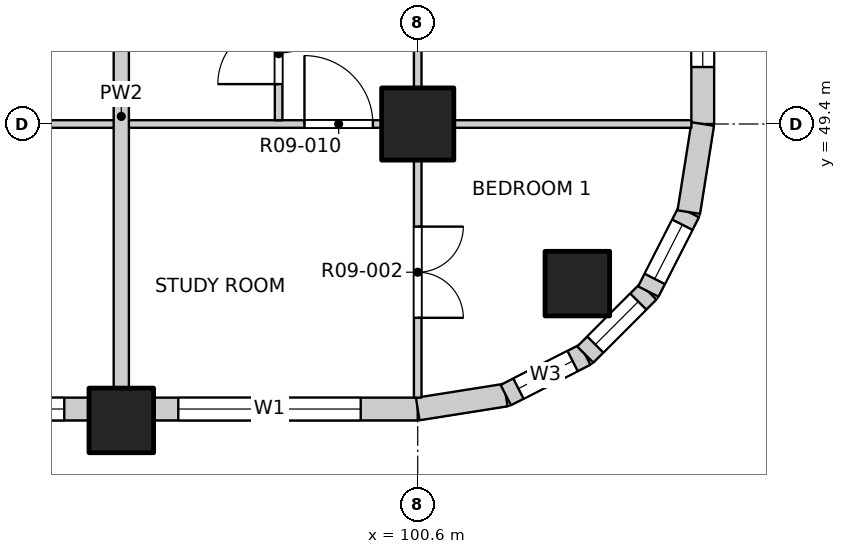
"""IFC4 building model, lengths in metres.
Left out: names, types, materials, properties, quantities, classifications, styles, units other than length and angle.
Written with IfcOpenShell. Run it as: python <this file> out.ifc"""

import sys

from ifc_helpers import new_model, si_unit, direction, frame, frame_2d, origin, origin_2d, place, context, subcontext, project, spatial, rectangle, extrude, element, fill, save


model = new_model("IFC4")
c1 = context("Model", 3, precision=1e-05, world=origin(), true_north=direction((0.0, 1.0)))
c2 = subcontext(c1, "Body", "Model", "MODEL_VIEW")
j1 = project(units=[si_unit("LENGTHUNIT", "METRE"), si_unit("PLANEANGLEUNIT", "RADIAN")], contexts=[c1])
p1 = place(None, origin())
s1 = spatial("IfcSite", under=j1, at=p1, CompositionType="ELEMENT")
p2 = place(p1, origin())
s2 = spatial("IfcBuilding", under=s1, at=p2, CompositionType="ELEMENT")
p3 = place(p2, frame((0.0, 0.0, 113.5)))
s3 = spatial("IfcBuildingStorey", under=s2, at=p3, CompositionType="ELEMENT", Elevation=113.5)
for number, where, z_axis, x_axis in (
    (1, (102.7, 47.3, -0.25), (0.0, 0.0, 1.0), (1.0, 0.0, 0.0)),
    (2, (96.7, 45.5, -0.25), (0.0, 0.0, 1.0), (1.0, 0.0, 0.0)),
):
    element("IfcColumn", number, at=place(p3, frame(where, z_axis=z_axis, x_axis=x_axis)), inside=s3, PredefinedType="COLUMN", context=c2, shape_type="SweptSolid", body=[
        extrude(rectangle(XDim=0.85, YDim=0.85, at=origin_2d()), origin(), (0.0, 0.0, 1.0), 3.35),
    ])
p4 = place(p3, frame((100.6, 49.4, -0.25), z_axis=(0.0, 0.0, 1.0), x_axis=(1.0, 0.0, 0.0)))
e3 = element("IfcColumn", 3, at=p4, inside=s3, PredefinedType="COLUMN", context=c2, shape_type="SweptSolid", body=[
    extrude(rectangle(XDim=0.95, YDim=0.95, at=origin_2d()), origin(), (0.0, 0.0, 1.0), 3.35),
])
p5 = place(p3, frame((89.325, 45.65, 0.0), z_axis=(0.0, 0.0, 1.0), x_axis=(1.0, 0.0, 0.0)))
e4 = element("IfcWall", 4, at=p5, inside=s3, PredefinedType="SOLIDWALL", context=c2, shape_type="SweptSolid", body=[
    extrude(rectangle(XDim=6.95, YDim=0.3, at=frame_2d((3.475, 0.0))), origin(), (0.0, 0.0, 1.0), 3.1),
])
p6 = place(p5, frame((0.325, 0.0, 0.9)))
e5 = element("IfcOpeningElement", 5, at=p6, cuts=e4, PredefinedType="OPENING", context=c2, shape_type="SweptSolid", body=[
    extrude(rectangle(XDim=2.4, YDim=1.8, at=frame_2d((1.2, 0.9))), frame((0.0, 0.16, 0.0), z_axis=(0.0, -1.0, 0.0), x_axis=(1.0, 0.0, 0.0)), (0.0, 0.0, 1.0), 0.32),
])
p7 = place(p5, frame((4.225, 0.0, 0.9)))
e6 = element("IfcOpeningElement", 6, at=p7, cuts=e4, PredefinedType="OPENING", context=c2, shape_type="SweptSolid", body=[
    extrude(rectangle(XDim=2.4, YDim=1.8, at=frame_2d((1.2, 0.9))), frame((0.0, 0.16, 0.0), z_axis=(0.0, -1.0, 0.0), x_axis=(1.0, 0.0, 0.0)), (0.0, 0.0, 1.0), 0.32),
])
p8 = place(p3, frame((97.125, 45.65, 0.0), z_axis=(0.0, 0.0, 1.0), x_axis=(1.0, 0.0, 0.0)))
e7 = element("IfcWall", 7, at=p8, inside=s3, PredefinedType="SOLIDWALL", context=c2, shape_type="SweptSolid", body=[
    extrude(rectangle(XDim=3.475, YDim=0.3, at=frame_2d((1.738, 0.0))), origin(), (0.0, 0.0, 1.0), 3.1),
])
p9 = place(p8, frame((0.325, 0.0, 0.9)))
e8 = element("IfcOpeningElement", 8, at=p9, cuts=e7, PredefinedType="OPENING", context=c2, shape_type="SweptSolid", body=[
    extrude(rectangle(XDim=2.4, YDim=1.8, at=frame_2d((1.2, 0.9))), frame((0.0, 0.16, 0.0), z_axis=(0.0, -1.0, 0.0), x_axis=(1.0, 0.0, 0.0)), (0.0, 0.0, 1.0), 0.32),
])
p10 = place(p3, frame((104.35, 49.4, 0.0), z_axis=(0.0, 0.0, 1.0), x_axis=(0.0, 1.0, 0.0)))
e9 = element("IfcWall", 9, at=p10, inside=s3, PredefinedType="SOLIDWALL", context=c2, shape_type="SweptSolid", body=[
    extrude(rectangle(XDim=3.475, YDim=0.3, at=frame_2d((1.738, 0.0))), origin(), (0.0, 0.0, 1.0), 3.1),
])
p11 = place(p10, frame((0.75, 0.0, 0.9)))
e10 = element("IfcOpeningElement", 10, at=p11, cuts=e9, PredefinedType="OPENING", context=c2, shape_type="SweptSolid", body=[
    extrude(rectangle(XDim=2.4, YDim=1.8, at=frame_2d((1.2, 0.9))), frame((0.0, 0.16, 0.0), z_axis=(0.0, -1.0, 0.0), x_axis=(1.0, 0.0, 0.0)), (0.0, 0.0, 1.0), 0.32),
])
p12 = place(p3, frame((100.6, 45.65, 0.0), z_axis=(0.0, 0.0, 1.0), x_axis=(0.987678452879, 0.156496880861, 0.0)))
e11 = element("IfcWall", 11, at=p12, inside=s3, PredefinedType="SOLIDWALL", context=c2, shape_type="SweptSolid", body=[
    extrude(rectangle(XDim=1.173, YDim=0.3, at=frame_2d((0.586, 0.0))), origin(), (0.0, 0.0, 1.0), 3.1),
])
p13 = place(p3, frame((101.759, 45.833, 0.0), z_axis=(0.0, 0.0, 1.0), x_axis=(0.890988677504, 0.454025524128, 0.0)))
e12 = element("IfcWall", 12, at=p13, inside=s3, PredefinedType="SOLIDWALL", context=c2, shape_type="SweptSolid", body=[
    extrude(rectangle(XDim=1.173, YDim=0.3, at=frame_2d((0.587, 0.0))), origin(), (0.0, 0.0, 1.0), 3.1),
])
p14 = place(p13, frame((0.187, 0.0, 0.9)))
e13 = element("IfcOpeningElement", 13, at=p14, cuts=e12, PredefinedType="OPENING", context=c2, shape_type="SweptSolid", body=[
    extrude(rectangle(XDim=0.8, YDim=1.2, at=frame_2d((0.4, 0.6))), frame((0.0, 0.16, 0.0), z_axis=(0.0, -1.0, 0.0), x_axis=(1.0, 0.0, 0.0)), (0.0, 0.0, 1.0), 0.32),
])
p15 = place(p3, frame((102.804, 46.366, 0.0), z_axis=(0.0, 0.0, 1.0), x_axis=(0.707106781187, 0.707106781187, 0.0)))
e14 = element("IfcWall", 14, at=p15, inside=s3, PredefinedType="SOLIDWALL", context=c2, shape_type="SweptSolid", body=[
    extrude(rectangle(XDim=1.173, YDim=0.3, at=frame_2d((0.586, 0.0))), origin(), (0.0, 0.0, 1.0), 3.1),
])
p16 = place(p15, frame((0.187, 0.0, 0.9)))
e15 = element("IfcOpeningElement", 15, at=p16, cuts=e14, PredefinedType="OPENING", context=c2, shape_type="SweptSolid", body=[
    extrude(rectangle(XDim=0.8, YDim=1.2, at=frame_2d((0.4, 0.6))), frame((0.0, 0.16, 0.0), z_axis=(0.0, -1.0, 0.0), x_axis=(1.0, 0.0, 0.0)), (0.0, 0.0, 1.0), 0.32),
])
p17 = place(p3, frame((103.634, 47.196, 0.0), z_axis=(0.0, 0.0, 1.0), x_axis=(0.454025524128, 0.890988677504, 0.0)))
e16 = element("IfcWall", 16, at=p17, inside=s3, PredefinedType="SOLIDWALL", context=c2, shape_type="SweptSolid", body=[
    extrude(rectangle(XDim=1.173, YDim=0.3, at=frame_2d((0.587, 0.0))), origin(), (0.0, 0.0, 1.0), 3.1),
])
p18 = place(p17, frame((0.187, 0.0, 0.9)))
e17 = element("IfcOpeningElement", 17, at=p18, cuts=e16, PredefinedType="OPENING", context=c2, shape_type="SweptSolid", body=[
    extrude(rectangle(XDim=0.8, YDim=1.2, at=frame_2d((0.4, 0.6))), frame((0.0, 0.16, 0.0), z_axis=(0.0, -1.0, 0.0), x_axis=(1.0, 0.0, 0.0)), (0.0, 0.0, 1.0), 0.32),
])
p19 = place(p3, frame((104.167, 48.241, 0.0), z_axis=(0.0, 0.0, 1.0), x_axis=(0.156496880861, 0.987678452879, 0.0)))
e18 = element("IfcWall", 18, at=p19, inside=s3, PredefinedType="SOLIDWALL", context=c2, shape_type="SweptSolid", body=[
    extrude(rectangle(XDim=1.173, YDim=0.3, at=frame_2d((0.586, 0.0))), origin(), (0.0, 0.0, 1.0), 3.1),
])
p20 = place(p3, frame((65.8, 49.4, 0.0), z_axis=(0.0, 0.0, 1.0), x_axis=(1.0, 0.0, 0.0)))
e19 = element("IfcWall", 19, at=p20, inside=s3, PredefinedType="PARTITIONING", context=c2, shape_type="SweptSolid", body=[
    extrude(rectangle(XDim=38.4, YDim=0.1, at=frame_2d((19.2, 0.0))), origin(), (0.0, 0.0, 1.0), 3.1),
])
p21 = place(p20, frame((4.19, 0.0, 0.0)))
e20 = element("IfcOpeningElement", 20, at=p21, cuts=e19, PredefinedType="OPENING", context=c2, shape_type="SweptSolid", body=[
    extrude(rectangle(XDim=0.9, YDim=2.1, at=frame_2d((0.45, 1.05))), frame((0.0, 0.06, 0.0), z_axis=(0.0, -1.0, 0.0), x_axis=(1.0, 0.0, 0.0)), (0.0, 0.0, 1.0), 0.12),
])
p22 = place(p20, frame((9.0, 0.0, 0.0)))
e21 = element("IfcOpeningElement", 21, at=p22, cuts=e19, PredefinedType="OPENING", context=c2, shape_type="SweptSolid", body=[
    extrude(rectangle(XDim=0.9, YDim=2.1, at=frame_2d((0.45, 1.05))), frame((0.0, 0.06, 0.0), z_axis=(0.0, -1.0, 0.0), x_axis=(1.0, 0.0, 0.0)), (0.0, 0.0, 1.0), 0.12),
])
p23 = place(p20, frame((12.9, 0.0, 0.0)))
e22 = element("IfcOpeningElement", 22, at=p23, cuts=e19, PredefinedType="OPENING", context=c2, shape_type="SweptSolid", body=[
    extrude(rectangle(XDim=0.9, YDim=2.1, at=frame_2d((0.45, 1.05))), frame((0.0, 0.06, 0.0), z_axis=(0.0, -1.0, 0.0), x_axis=(1.0, 0.0, 0.0)), (0.0, 0.0, 1.0), 0.12),
])
p24 = place(p20, frame((16.8, 0.0, 0.0)))
e23 = element("IfcOpeningElement", 23, at=p24, cuts=e19, PredefinedType="OPENING", context=c2, shape_type="SweptSolid", body=[
    extrude(rectangle(XDim=0.9, YDim=2.1, at=frame_2d((0.45, 1.05))), frame((0.0, 0.06, 0.0), z_axis=(0.0, -1.0, 0.0), x_axis=(1.0, 0.0, 0.0)), (0.0, 0.0, 1.0), 0.12),
])
p25 = place(p20, frame((20.7, 0.0, 0.0)))
e24 = element("IfcOpeningElement", 24, at=p25, cuts=e19, PredefinedType="OPENING", context=c2, shape_type="SweptSolid", body=[
    extrude(rectangle(XDim=0.9, YDim=2.1, at=frame_2d((0.45, 1.05))), frame((0.0, 0.06, 0.0), z_axis=(0.0, -1.0, 0.0), x_axis=(1.0, 0.0, 0.0)), (0.0, 0.0, 1.0), 0.12),
])
p26 = place(p20, frame((24.6, 0.0, 0.0)))
e25 = element("IfcOpeningElement", 25, at=p26, cuts=e19, PredefinedType="OPENING", context=c2, shape_type="SweptSolid", body=[
    extrude(rectangle(XDim=0.9, YDim=2.1, at=frame_2d((0.45, 1.05))), frame((0.0, 0.06, 0.0), z_axis=(0.0, -1.0, 0.0), x_axis=(1.0, 0.0, 0.0)), (0.0, 0.0, 1.0), 0.12),
])
p27 = place(p20, frame((28.5, 0.0, 0.0)))
e26 = element("IfcOpeningElement", 26, at=p27, cuts=e19, PredefinedType="OPENING", context=c2, shape_type="SweptSolid", body=[
    extrude(rectangle(XDim=0.9, YDim=2.1, at=frame_2d((0.45, 1.05))), frame((0.0, 0.06, 0.0), z_axis=(0.0, -1.0, 0.0), x_axis=(1.0, 0.0, 0.0)), (0.0, 0.0, 1.0), 0.12),
])
p28 = place(p20, frame((33.31, 0.0, 0.0)))
e27 = element("IfcOpeningElement", 27, at=p28, cuts=e19, PredefinedType="OPENING", context=c2, shape_type="SweptSolid", body=[
    extrude(rectangle(XDim=0.9, YDim=2.1, at=frame_2d((0.45, 1.05))), frame((0.0, 0.06, 0.0), z_axis=(0.0, -1.0, 0.0), x_axis=(1.0, 0.0, 0.0)), (0.0, 0.0, 1.0), 0.12),
])
p29 = place(p3, frame((96.7, 45.8, 0.0), z_axis=(0.0, 0.0, 1.0), x_axis=(0.0, 1.0, 0.0)))
e28 = element("IfcWall", 28, at=p29, inside=s3, PredefinedType="PARTITIONING", context=c2, shape_type="SweptSolid", body=[
    extrude(rectangle(XDim=7.4, YDim=0.2, at=frame_2d((3.7, 0.0))), origin(), (0.0, 0.0, 1.0), 3.1),
])
p30 = place(p3, frame((98.77, 49.45, 0.0), z_axis=(0.0, 0.0, 1.0), x_axis=(0.0, 1.0, 0.0)))
e29 = element("IfcWall", 29, at=p30, inside=s3, PredefinedType="PARTITIONING", context=c2, shape_type="SweptSolid", body=[
    extrude(rectangle(XDim=5.5, YDim=0.1, at=frame_2d((2.75, 0.0))), origin(), (0.0, 0.0, 1.0), 3.1),
])
p31 = place(p30, frame((0.475, 0.0, 0.0)))
e30 = element("IfcOpeningElement", 30, at=p31, cuts=e29, PredefinedType="OPENING", context=c2, shape_type="SweptSolid", body=[
    extrude(rectangle(XDim=0.8, YDim=2.1, at=frame_2d((0.4, 1.05))), frame((0.0, 0.06, 0.0), z_axis=(0.0, -1.0, 0.0), x_axis=(1.0, 0.0, 0.0)), (0.0, 0.0, 1.0), 0.12),
])
p32 = place(p30, frame((2.325, 0.0, 0.0)))
e31 = element("IfcOpeningElement", 31, at=p32, cuts=e29, PredefinedType="OPENING", context=c2, shape_type="SweptSolid", body=[
    extrude(rectangle(XDim=0.9, YDim=2.1, at=frame_2d((0.45, 1.05))), frame((0.0, 0.06, 0.0), z_axis=(0.0, -1.0, 0.0), x_axis=(1.0, 0.0, 0.0)), (0.0, 0.0, 1.0), 0.12),
])
p33 = place(p30, frame((4.2, 0.0, 0.0)))
e32 = element("IfcOpeningElement", 32, at=p33, cuts=e29, PredefinedType="OPENING", context=c2, shape_type="SweptSolid", body=[
    extrude(rectangle(XDim=0.9, YDim=2.1, at=frame_2d((0.45, 1.05))), frame((0.0, 0.06, 0.0), z_axis=(0.0, -1.0, 0.0), x_axis=(1.0, 0.0, 0.0)), (0.0, 0.0, 1.0), 0.12),
])
p34 = place(p3, frame((100.6, 45.8, 0.0), z_axis=(0.0, 0.0, 1.0), x_axis=(0.0, 1.0, 0.0)))
e33 = element("IfcWall", 33, at=p34, inside=s3, PredefinedType="PARTITIONING", context=c2, shape_type="SweptSolid", body=[
    extrude(rectangle(XDim=38.4, YDim=0.1, at=frame_2d((19.2, 0.0))), origin(), (0.0, 0.0, 1.0), 3.1),
])
p35 = place(p34, frame((1.05, 0.0, 0.0)))
e34 = element("IfcOpeningElement", 34, at=p35, cuts=e33, PredefinedType="OPENING", context=c2, shape_type="SweptSolid", body=[
    extrude(rectangle(XDim=1.2, YDim=2.1, at=frame_2d((0.6, 1.05))), frame((0.0, 0.06, 0.0), z_axis=(0.0, -1.0, 0.0), x_axis=(1.0, 0.0, 0.0)), (0.0, 0.0, 1.0), 0.12),
])
p36 = place(p34, frame((5.1, 0.0, 0.0)))
e35 = element("IfcOpeningElement", 35, at=p36, cuts=e33, PredefinedType="OPENING", context=c2, shape_type="SweptSolid", body=[
    extrude(rectangle(XDim=0.9, YDim=2.1, at=frame_2d((0.45, 1.05))), frame((0.0, 0.06, 0.0), z_axis=(0.0, -1.0, 0.0), x_axis=(1.0, 0.0, 0.0)), (0.0, 0.0, 1.0), 0.12),
])
p37 = place(p34, frame((9.625, 0.0, 0.0)))
e36 = element("IfcOpeningElement", 36, at=p37, cuts=e33, PredefinedType="OPENING", context=c2, shape_type="SweptSolid", body=[
    extrude(rectangle(XDim=1.2, YDim=2.1, at=frame_2d((0.6, 1.05))), frame((0.0, 0.06, 0.0), z_axis=(0.0, -1.0, 0.0), x_axis=(1.0, 0.0, 0.0)), (0.0, 0.0, 1.0), 0.12),
])
p38 = place(p34, frame((16.8, 0.0, 0.0)))
e37 = element("IfcOpeningElement", 37, at=p38, cuts=e33, PredefinedType="OPENING", context=c2, shape_type="SweptSolid", body=[
    extrude(rectangle(XDim=0.9, YDim=2.1, at=frame_2d((0.45, 1.05))), frame((0.0, 0.06, 0.0), z_axis=(0.0, -1.0, 0.0), x_axis=(1.0, 0.0, 0.0)), (0.0, 0.0, 1.0), 0.12),
])
p39 = place(p34, frame((20.7, 0.0, 0.0)))
e38 = element("IfcOpeningElement", 38, at=p39, cuts=e33, PredefinedType="OPENING", context=c2, shape_type="SweptSolid", body=[
    extrude(rectangle(XDim=0.9, YDim=2.1, at=frame_2d((0.45, 1.05))), frame((0.0, 0.06, 0.0), z_axis=(0.0, -1.0, 0.0), x_axis=(1.0, 0.0, 0.0)), (0.0, 0.0, 1.0), 0.12),
])
p40 = place(p34, frame((24.6, 0.0, 0.0)))
e39 = element("IfcOpeningElement", 39, at=p40, cuts=e33, PredefinedType="OPENING", context=c2, shape_type="SweptSolid", body=[
    extrude(rectangle(XDim=0.9, YDim=2.1, at=frame_2d((0.45, 1.05))), frame((0.0, 0.06, 0.0), z_axis=(0.0, -1.0, 0.0), x_axis=(1.0, 0.0, 0.0)), (0.0, 0.0, 1.0), 0.12),
])
p41 = place(p34, frame((28.5, 0.0, 0.0)))
e40 = element("IfcOpeningElement", 40, at=p41, cuts=e33, PredefinedType="OPENING", context=c2, shape_type="SweptSolid", body=[
    extrude(rectangle(XDim=0.9, YDim=2.1, at=frame_2d((0.45, 1.05))), frame((0.0, 0.06, 0.0), z_axis=(0.0, -1.0, 0.0), x_axis=(1.0, 0.0, 0.0)), (0.0, 0.0, 1.0), 0.12),
])
p42 = place(p34, frame((32.4, 0.0, 0.0)))
e41 = element("IfcOpeningElement", 41, at=p42, cuts=e33, PredefinedType="OPENING", context=c2, shape_type="SweptSolid", body=[
    extrude(rectangle(XDim=0.9, YDim=2.1, at=frame_2d((0.45, 1.05))), frame((0.0, 0.06, 0.0), z_axis=(0.0, -1.0, 0.0), x_axis=(1.0, 0.0, 0.0)), (0.0, 0.0, 1.0), 0.12),
])
p43 = place(p34, frame((36.15, 0.0, 0.0)))
e42 = element("IfcOpeningElement", 42, at=p43, cuts=e33, PredefinedType="OPENING", context=c2, shape_type="SweptSolid", body=[
    extrude(rectangle(XDim=1.2, YDim=2.1, at=frame_2d((0.6, 1.05))), frame((0.0, 0.06, 0.0), z_axis=(0.0, -1.0, 0.0), x_axis=(1.0, 0.0, 0.0)), (0.0, 0.0, 1.0), 0.12),
])
p44 = place(p7, origin())
e43 = element("IfcWindow", 43, at=p44, inside=s3, PartitioningType="DOUBLE_PANEL_VERTICAL", PredefinedType="WINDOW", context=c2, shape_type="SweptSolid", body=[
    extrude(rectangle(XDim=2.4, YDim=1.8, at=frame_2d((1.2, 0.9))), frame((0.0, 0.03, 0.0), z_axis=(0.0, -1.0, 0.0), x_axis=(1.0, 0.0, 0.0)), (0.0, 0.0, 1.0), 0.06),
])
fill(e6, e43)
p45 = place(p9, origin())
e44 = element("IfcWindow", 44, at=p45, inside=s3, PartitioningType="DOUBLE_PANEL_VERTICAL", PredefinedType="WINDOW", context=c2, shape_type="SweptSolid", body=[
    extrude(rectangle(XDim=2.4, YDim=1.8, at=frame_2d((1.2, 0.9))), frame((0.0, 0.03, 0.0), z_axis=(0.0, -1.0, 0.0), x_axis=(1.0, 0.0, 0.0)), (0.0, 0.0, 1.0), 0.06),
])
fill(e8, e44)
p46 = place(p11, origin())
e45 = element("IfcWindow", 45, at=p46, inside=s3, PartitioningType="DOUBLE_PANEL_VERTICAL", PredefinedType="WINDOW", context=c2, shape_type="SweptSolid", body=[
    extrude(rectangle(XDim=2.4, YDim=1.8, at=frame_2d((1.2, 0.9))), frame((0.0, 0.03, 0.0), z_axis=(0.0, -1.0, 0.0), x_axis=(1.0, 0.0, 0.0)), (0.0, 0.0, 1.0), 0.06),
])
fill(e10, e45)
p47 = place(p14, origin())
e46 = element("IfcWindow", 46, at=p47, inside=s3, PartitioningType="SINGLE_PANEL", PredefinedType="WINDOW", context=c2, shape_type="SweptSolid", body=[
    extrude(rectangle(XDim=0.8, YDim=1.2, at=frame_2d((0.4, 0.6))), frame((0.0, 0.03, 0.0), z_axis=(0.0, -1.0, 0.0), x_axis=(1.0, 0.0, 0.0)), (0.0, 0.0, 1.0), 0.06),
])
fill(e13, e46)
p48 = place(p16, origin())
e47 = element("IfcWindow", 47, at=p48, inside=s3, PartitioningType="SINGLE_PANEL", PredefinedType="WINDOW", context=c2, shape_type="SweptSolid", body=[
    extrude(rectangle(XDim=0.8, YDim=1.2, at=frame_2d((0.4, 0.6))), frame((0.0, 0.03, 0.0), z_axis=(0.0, -1.0, 0.0), x_axis=(1.0, 0.0, 0.0)), (0.0, 0.0, 1.0), 0.06),
])
fill(e15, e47)
p49 = place(p18, origin())
e48 = element("IfcWindow", 48, at=p49, inside=s3, PartitioningType="SINGLE_PANEL", PredefinedType="WINDOW", context=c2, shape_type="SweptSolid", body=[
    extrude(rectangle(XDim=0.8, YDim=1.2, at=frame_2d((0.4, 0.6))), frame((0.0, 0.03, 0.0), z_axis=(0.0, -1.0, 0.0), x_axis=(1.0, 0.0, 0.0)), (0.0, 0.0, 1.0), 0.06),
])
fill(e17, e48)
p50 = place(p35, origin())
e49 = element("IfcDoor", 49, at=p50, inside=s3, OperationType="DOUBLE_DOOR_SINGLE_SWING", PredefinedType="DOOR", context=c2, shape_type="SweptSolid", body=[
    extrude(rectangle(XDim=1.2, YDim=2.1, at=frame_2d((0.6, 1.05))), frame((0.0, 0.025, 0.0), z_axis=(0.0, -1.0, 0.0), x_axis=(1.0, 0.0, 0.0)), (0.0, 0.0, 1.0), 0.05),
])
fill(e34, e49)
p51 = place(p28, origin())
e50 = element("IfcDoor", 50, at=p51, inside=s3, OperationType="SINGLE_SWING_LEFT", PredefinedType="DOOR", context=c2, shape_type="SweptSolid", body=[
    extrude(rectangle(XDim=0.9, YDim=2.1, at=frame_2d((0.45, 1.05))), frame((0.0, 0.025, 0.0), z_axis=(0.0, -1.0, 0.0), x_axis=(1.0, 0.0, 0.0)), (0.0, 0.0, 1.0), 0.05),
])
fill(e27, e50)
p52 = place(p31, origin())
e51 = element("IfcDoor", 51, at=p52, inside=s3, OperationType="SINGLE_SWING_LEFT", PredefinedType="DOOR", context=c2, shape_type="SweptSolid", body=[
    extrude(rectangle(XDim=0.8, YDim=2.1, at=frame_2d((0.4, 1.05))), frame((0.0, 0.025, 0.0), z_axis=(0.0, -1.0, 0.0), x_axis=(1.0, 0.0, 0.0)), (0.0, 0.0, 1.0), 0.05),
])
fill(e30, e51)
save(model, sys.argv[1])
